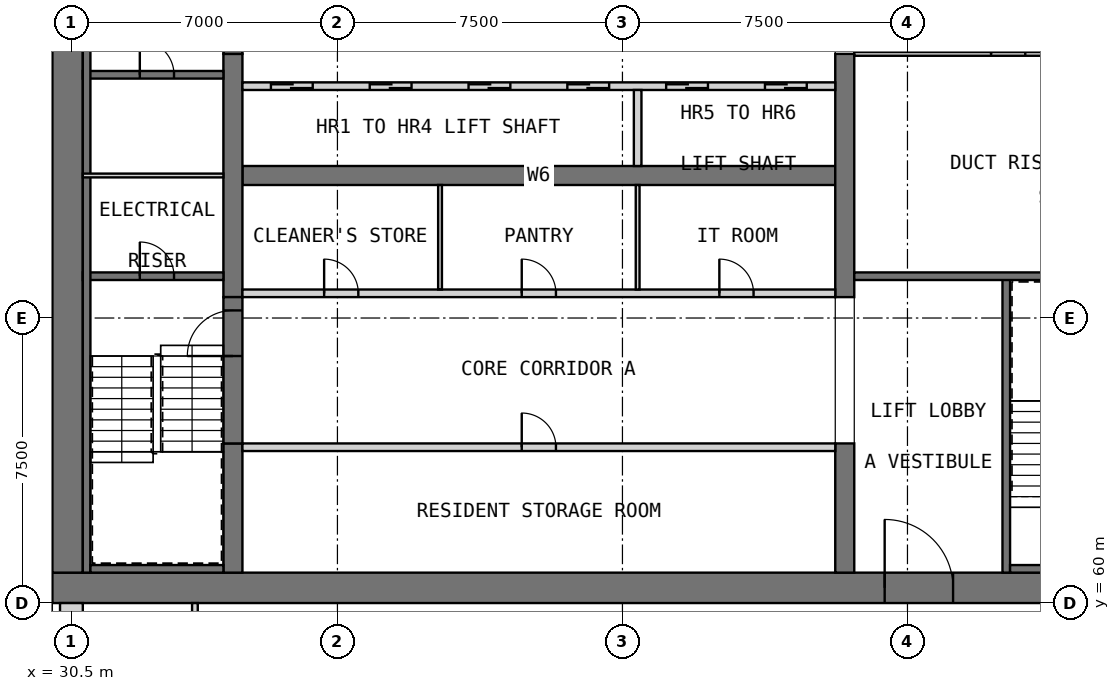
"""IFC4 building model, lengths in metres.
Left out: names, types, materials, properties, quantities, classifications, styles, units other than length and angle.
Written with IfcOpenShell. Run it as: python <this file> out.ifc"""

import sys

from ifc_helpers import new_model, si_unit, direction, frame, frame_2d, origin, place, context, subcontext, project, spatial, rectangle, extrude, element, fill, save


model = new_model("IFC4")
c1 = context("Model", 3, precision=1e-05, world=origin(), true_north=direction((0.0, 1.0)))
c2 = subcontext(c1, "Body", "Model", "MODEL_VIEW")
j1 = project(units=[si_unit("LENGTHUNIT", "METRE"), si_unit("PLANEANGLEUNIT", "RADIAN")], contexts=[c1])
p1 = place(None, origin())
s1 = spatial("IfcSite", under=j1, at=p1, CompositionType="ELEMENT")
p2 = place(p1, origin())
s2 = spatial("IfcBuilding", under=s1, at=p2, CompositionType="ELEMENT")
p3 = place(p2, frame((0.0, 0.0, 210.7)))
s3 = spatial("IfcBuildingStorey", under=s2, at=p3, CompositionType="ELEMENT", Elevation=210.7)
p4 = place(p3, frame((30.0, 60.4, 0.0), z_axis=(0.0, 0.0, 1.0), x_axis=(1.0, 0.0, 0.0)))
e1 = element("IfcWall", 1, at=p4, inside=s3, PredefinedType="SHEAR", context=c2, shape_type="SweptSolid", body=[
    extrude(rectangle(XDim=30.0, YDim=0.8, at=frame_2d((15.0, 0.0))), origin(), (0.0, 0.0, 1.0), 3.5),
])
p5 = place(p4, frame((21.9, 0.0, 0.0)))
e2 = element("IfcOpeningElement", 2, at=p5, cuts=e1, PredefinedType="OPENING", context=c2, shape_type="SweptSolid", body=[
    extrude(rectangle(XDim=1.8, YDim=2.1, at=frame_2d((0.9, 1.05))), frame((0.0, 0.41, 0.0), z_axis=(0.0, -1.0, 0.0), x_axis=(1.0, 0.0, 0.0)), (0.0, 0.0, 1.0), 0.82),
])
p6 = place(p4, frame((26.5, 0.0, 0.0)))
e3 = element("IfcOpeningElement", 3, at=p6, cuts=e1, PredefinedType="OPENING", context=c2, shape_type="SweptSolid", body=[
    extrude(rectangle(XDim=1.2, YDim=2.1, at=frame_2d((0.6, 1.05))), frame((0.0, 0.41, 0.0), z_axis=(0.0, -1.0, 0.0), x_axis=(1.0, 0.0, 0.0)), (0.0, 0.0, 1.0), 0.82),
])
p7 = place(p3, frame((30.4, 60.8, 0.0), z_axis=(0.0, 0.0, 1.0), x_axis=(0.0, 1.0, 0.0)))
e4 = element("IfcWall", 4, at=p7, inside=s3, PredefinedType="SHEAR", context=c2, shape_type="SweptSolid", body=[
    extrude(rectangle(XDim=20.9, YDim=0.8, at=frame_2d((10.45, 0.0))), origin(), (0.0, 0.0, 1.0), 3.5),
])
p8 = place(p3, frame((35.0, 71.25, 0.0), z_axis=(0.0, 0.0, 1.0), x_axis=(1.0, 0.0, 0.0)))
e5 = element("IfcWall", 5, at=p8, inside=s3, PredefinedType="SHEAR", context=c2, shape_type="SweptSolid", body=[
    extrude(rectangle(XDim=15.6, YDim=0.5, at=frame_2d((7.8, 0.0))), origin(), (0.0, 0.0, 1.0), 3.5),
])
p9 = place(p3, frame((34.75, 60.8, 0.0), z_axis=(0.0, 0.0, 1.0), x_axis=(0.0, 1.0, 0.0)))
e6 = element("IfcWall", 6, at=p9, inside=s3, PredefinedType="SHEAR", context=c2, shape_type="SweptSolid", body=[
    extrude(rectangle(XDim=3.4, YDim=0.5, at=frame_2d((1.7, 0.0))), origin(), (0.0, 0.0, 1.0), 3.5),
])
p10 = place(p3, frame((34.75, 68.05, 0.0), z_axis=(0.0, 0.0, 1.0), x_axis=(0.0, 1.0, 0.0)))
e7 = element("IfcWall", 7, at=p10, inside=s3, PredefinedType="SHEAR", context=c2, shape_type="SweptSolid", body=[
    extrude(rectangle(XDim=6.4, YDim=0.5, at=frame_2d((3.2, 0.0))), origin(), (0.0, 0.0, 1.0), 3.5),
])
p11 = place(p3, frame((50.85, 60.8, 0.0), z_axis=(0.0, 0.0, 1.0), x_axis=(0.0, 1.0, 0.0)))
e8 = element("IfcWall", 8, at=p11, inside=s3, PredefinedType="SHEAR", context=c2, shape_type="SweptSolid", body=[
    extrude(rectangle(XDim=3.4, YDim=0.5, at=frame_2d((1.7, 0.0))), origin(), (0.0, 0.0, 1.0), 3.5),
])
p12 = place(p3, frame((50.85, 68.05, 0.0), z_axis=(0.0, 0.0, 1.0), x_axis=(0.0, 1.0, 0.0)))
e9 = element("IfcWall", 9, at=p12, inside=s3, PredefinedType="SHEAR", context=c2, shape_type="SweptSolid", body=[
    extrude(rectangle(XDim=6.4, YDim=0.5, at=frame_2d((3.2, 0.0))), origin(), (0.0, 0.0, 1.0), 3.5),
])
p13 = place(p3, frame((30.5, 60.0, 0.0), z_axis=(0.0, 0.0, 1.0), x_axis=(0.0, -1.0, 0.0)))
e10 = element("IfcWall", 10, at=p13, inside=s3, PredefinedType="SOLIDWALL", context=c2, shape_type="SweptSolid", body=[
    extrude(rectangle(XDim=7.0, YDim=0.6, at=frame_2d((3.5, 0.0))), origin(), (0.0, 0.0, 1.0), 3.1),
])
p14 = place(p13, frame((4.175, 0.0, 0.8)))
e11 = element("IfcOpeningElement", 11, at=p14, cuts=e10, PredefinedType="OPENING", context=c2, shape_type="SweptSolid", body=[
    extrude(rectangle(XDim=2.4, YDim=1.8, at=frame_2d((1.2, 0.9))), frame((0.0, 0.31, 0.0), z_axis=(0.0, -1.0, 0.0), x_axis=(1.0, 0.0, 0.0)), (0.0, 0.0, 1.0), 0.62),
])
p15 = place(p13, frame((0.675, 0.0, 0.8)))
e12 = element("IfcOpeningElement", 12, at=p15, cuts=e10, PredefinedType="OPENING", context=c2, shape_type="SweptSolid", body=[
    extrude(rectangle(XDim=2.4, YDim=1.8, at=frame_2d((1.2, 0.9))), frame((0.0, 0.31, 0.0), z_axis=(0.0, -1.0, 0.0), x_axis=(1.0, 0.0, 0.0)), (0.0, 0.0, 1.0), 0.62),
])
p16 = place(p3, frame((35.0, 64.1, 0.0), z_axis=(0.0, 0.0, 1.0), x_axis=(1.0, 0.0, 0.0)))
e13 = element("IfcWall", 13, at=p16, inside=s3, PredefinedType="PARTITIONING", context=c2, shape_type="SweptSolid", body=[
    extrude(rectangle(XDim=15.6, YDim=0.2, at=frame_2d((7.8, 0.0))), origin(), (0.0, 0.0, 1.0), 3.09),
])
p17 = place(p16, frame((7.35, 0.0, 0.0)))
e14 = element("IfcOpeningElement", 14, at=p17, cuts=e13, PredefinedType="OPENING", context=c2, shape_type="SweptSolid", body=[
    extrude(rectangle(XDim=0.9, YDim=2.1, at=frame_2d((0.45, 1.05))), frame((0.0, 0.11, 0.0), z_axis=(0.0, -1.0, 0.0), x_axis=(1.0, 0.0, 0.0)), (0.0, 0.0, 1.0), 0.22),
])
p18 = place(p3, frame((35.0, 68.15, 0.0), z_axis=(0.0, 0.0, 1.0), x_axis=(1.0, 0.0, 0.0)))
e15 = element("IfcWall", 15, at=p18, inside=s3, PredefinedType="PARTITIONING", context=c2, shape_type="SweptSolid", body=[
    extrude(rectangle(XDim=15.6, YDim=0.2, at=frame_2d((7.8, 0.0))), origin(), (0.0, 0.0, 1.0), 3.09),
])
p19 = place(p18, frame((2.15, 0.0, 0.0)))
e16 = element("IfcOpeningElement", 16, at=p19, cuts=e15, PredefinedType="OPENING", context=c2, shape_type="SweptSolid", body=[
    extrude(rectangle(XDim=0.9, YDim=2.1, at=frame_2d((0.45, 1.05))), frame((0.0, 0.11, 0.0), z_axis=(0.0, -1.0, 0.0), x_axis=(1.0, 0.0, 0.0)), (0.0, 0.0, 1.0), 0.22),
])
p20 = place(p18, frame((7.35, 0.0, 0.0)))
e17 = element("IfcOpeningElement", 17, at=p20, cuts=e15, PredefinedType="OPENING", context=c2, shape_type="SweptSolid", body=[
    extrude(rectangle(XDim=0.9, YDim=2.1, at=frame_2d((0.45, 1.05))), frame((0.0, 0.11, 0.0), z_axis=(0.0, -1.0, 0.0), x_axis=(1.0, 0.0, 0.0)), (0.0, 0.0, 1.0), 0.22),
])
p21 = place(p18, frame((12.55, 0.0, 0.0)))
e18 = element("IfcOpeningElement", 18, at=p21, cuts=e15, PredefinedType="OPENING", context=c2, shape_type="SweptSolid", body=[
    extrude(rectangle(XDim=0.9, YDim=2.1, at=frame_2d((0.45, 1.05))), frame((0.0, 0.11, 0.0), z_axis=(0.0, -1.0, 0.0), x_axis=(1.0, 0.0, 0.0)), (0.0, 0.0, 1.0), 0.22),
])
for number, where, z_axis, x_axis in (
    (19, (40.2, 68.25, 0.0), (0.0, 0.0, 1.0), (0.0, 1.0, 0.0)),
    (20, (45.4, 68.25, 0.0), (0.0, 0.0, 1.0), (0.0, 1.0, 0.0)),
):
    element("IfcWall", number, at=place(p3, frame(where, z_axis=z_axis, x_axis=x_axis)), inside=s3, PredefinedType="PARTITIONING", context=c2, shape_type="SweptSolid", body=[
        extrude(rectangle(XDim=2.75, YDim=0.1, at=frame_2d((1.375, 0.0))), origin(), (0.0, 0.0, 1.0), 3.09),
    ])
p22 = place(p3, frame((35.0, 73.6, 0.0), z_axis=(0.0, 0.0, 1.0), x_axis=(1.0, 0.0, 0.0)))
e21 = element("IfcWall", 21, at=p22, inside=s3, PredefinedType="SOLIDWALL", context=c2, shape_type="SweptSolid", body=[
    extrude(rectangle(XDim=15.6, YDim=0.2, at=frame_2d((7.8, 0.0))), origin(), (0.0, 0.0, 1.0), 3.5),
])
p23 = place(p22, frame((0.75, 0.0, 0.0)))
e22 = element("IfcOpeningElement", 22, at=p23, cuts=e21, PredefinedType="OPENING", context=c2, shape_type="SweptSolid", body=[
    extrude(rectangle(XDim=1.1, YDim=2.1, at=frame_2d((0.55, 1.05))), frame((0.0, 0.11, 0.0), z_axis=(0.0, -1.0, 0.0), x_axis=(1.0, 0.0, 0.0)), (0.0, 0.0, 1.0), 0.22),
])
p24 = place(p22, frame((3.35, 0.0, 0.0)))
e23 = element("IfcOpeningElement", 23, at=p24, cuts=e21, PredefinedType="OPENING", context=c2, shape_type="SweptSolid", body=[
    extrude(rectangle(XDim=1.1, YDim=2.1, at=frame_2d((0.55, 1.05))), frame((0.0, 0.11, 0.0), z_axis=(0.0, -1.0, 0.0), x_axis=(1.0, 0.0, 0.0)), (0.0, 0.0, 1.0), 0.22),
])
p25 = place(p22, frame((5.95, 0.0, 0.0)))
e24 = element("IfcOpeningElement", 24, at=p25, cuts=e21, PredefinedType="OPENING", context=c2, shape_type="SweptSolid", body=[
    extrude(rectangle(XDim=1.1, YDim=2.1, at=frame_2d((0.55, 1.05))), frame((0.0, 0.11, 0.0), z_axis=(0.0, -1.0, 0.0), x_axis=(1.0, 0.0, 0.0)), (0.0, 0.0, 1.0), 0.22),
])
p26 = place(p22, frame((8.55, 0.0, 0.0)))
e25 = element("IfcOpeningElement", 25, at=p26, cuts=e21, PredefinedType="OPENING", context=c2, shape_type="SweptSolid", body=[
    extrude(rectangle(XDim=1.1, YDim=2.1, at=frame_2d((0.55, 1.05))), frame((0.0, 0.11, 0.0), z_axis=(0.0, -1.0, 0.0), x_axis=(1.0, 0.0, 0.0)), (0.0, 0.0, 1.0), 0.22),
])
p27 = place(p22, frame((11.15, 0.0, 0.0)))
e26 = element("IfcOpeningElement", 26, at=p27, cuts=e21, PredefinedType="OPENING", context=c2, shape_type="SweptSolid", body=[
    extrude(rectangle(XDim=1.1, YDim=2.1, at=frame_2d((0.55, 1.05))), frame((0.0, 0.11, 0.0), z_axis=(0.0, -1.0, 0.0), x_axis=(1.0, 0.0, 0.0)), (0.0, 0.0, 1.0), 0.22),
])
p28 = place(p22, frame((13.75, 0.0, 0.0)))
e27 = element("IfcOpeningElement", 27, at=p28, cuts=e21, PredefinedType="OPENING", context=c2, shape_type="SweptSolid", body=[
    extrude(rectangle(XDim=1.1, YDim=2.1, at=frame_2d((0.55, 1.05))), frame((0.0, 0.11, 0.0), z_axis=(0.0, -1.0, 0.0), x_axis=(1.0, 0.0, 0.0)), (0.0, 0.0, 1.0), 0.22),
])
p29 = place(p3, frame((45.4, 71.5, 0.0), z_axis=(0.0, 0.0, 1.0), x_axis=(0.0, 1.0, 0.0)))
e28 = element("IfcWall", 28, at=p29, inside=s3, PredefinedType="SOLIDWALL", context=c2, shape_type="SweptSolid", body=[
    extrude(rectangle(XDim=2.0, YDim=0.2, at=frame_2d((1.0, 0.0))), origin(), (0.0, 0.0, 1.0), 3.5),
])
p30 = place(p3, frame((34.75, 64.2, 0.0), z_axis=(0.0, 0.0, 1.0), x_axis=(0.0, 1.0, 0.0)))
e29 = element("IfcWall", 29, at=p30, inside=s3, PredefinedType="SOLIDWALL", context=c2, shape_type="SweptSolid", body=[
    extrude(rectangle(XDim=3.85, YDim=0.5, at=frame_2d((1.925, 0.0))), origin(), (0.0, 0.0, 1.0), 2.3),
])
p31 = place(p30, frame((2.3, 0.0, 0.0)))
e30 = element("IfcOpeningElement", 30, at=p31, cuts=e29, PredefinedType="OPENING", context=c2, shape_type="SweptSolid", body=[
    extrude(rectangle(XDim=1.2, YDim=2.1, at=frame_2d((0.6, 1.05))), frame((0.0, 0.26, 0.0), z_axis=(0.0, -1.0, 0.0), x_axis=(1.0, 0.0, 0.0)), (0.0, 0.0, 1.0), 0.52),
])
p32 = place(p3, frame((34.75, 74.45, 0.0), z_axis=(0.0, 0.0, 1.0), x_axis=(0.0, 1.0, 0.0)))
e31 = element("IfcWall", 31, at=p32, inside=s3, PredefinedType="SOLIDWALL", context=c2, shape_type="SweptSolid", body=[
    extrude(rectangle(XDim=3.85, YDim=0.5, at=frame_2d((1.925, 0.0))), origin(), (0.0, 0.0, 1.0), 2.3),
])
p33 = place(p32, frame((1.0, 0.0, 0.0)))
e32 = element("IfcOpeningElement", 32, at=p33, cuts=e31, PredefinedType="OPENING", context=c2, shape_type="SweptSolid", body=[
    extrude(rectangle(XDim=1.2, YDim=2.1, at=frame_2d((0.6, 1.05))), frame((0.0, 0.26, 0.0), z_axis=(0.0, -1.0, 0.0), x_axis=(1.0, 0.0, 0.0)), (0.0, 0.0, 1.0), 0.52),
])
p34 = place(p3, frame((30.8, 68.6, 0.0), z_axis=(0.0, 0.0, 1.0), x_axis=(1.0, 0.0, 0.0)))
e33 = element("IfcWall", 33, at=p34, inside=s3, PredefinedType="SOLIDWALL", context=c2, shape_type="SweptSolid", body=[
    extrude(rectangle(XDim=3.7, YDim=0.2, at=frame_2d((1.85, 0.0))), origin(), (0.0, 0.0, 1.0), 3.09),
])
p35 = place(p34, frame((1.5, 0.0, 0.0)))
e34 = element("IfcOpeningElement", 34, at=p35, cuts=e33, PredefinedType="OPENING", context=c2, shape_type="SweptSolid", body=[
    extrude(rectangle(XDim=0.9, YDim=2.1, at=frame_2d((0.45, 1.05))), frame((0.0, 0.11, 0.0), z_axis=(0.0, -1.0, 0.0), x_axis=(1.0, 0.0, 0.0)), (0.0, 0.0, 1.0), 0.22),
])
p36 = place(p3, frame((30.8, 73.9, 0.0), z_axis=(0.0, 0.0, 1.0), x_axis=(1.0, 0.0, 0.0)))
e35 = element("IfcWall", 35, at=p36, inside=s3, PredefinedType="SOLIDWALL", context=c2, shape_type="SweptSolid", body=[
    extrude(rectangle(XDim=3.7, YDim=0.2, at=frame_2d((1.85, 0.0))), origin(), (0.0, 0.0, 1.0), 3.09),
])
p37 = place(p36, frame((1.5, 0.0, 0.0)))
e36 = element("IfcOpeningElement", 36, at=p37, cuts=e35, PredefinedType="OPENING", context=c2, shape_type="SweptSolid", body=[
    extrude(rectangle(XDim=0.9, YDim=2.1, at=frame_2d((0.45, 1.05))), frame((0.0, 0.11, 0.0), z_axis=(0.0, -1.0, 0.0), x_axis=(1.0, 0.0, 0.0)), (0.0, 0.0, 1.0), 0.22),
])
p38 = place(p3, frame((55.1, 60.8, 0.0), z_axis=(0.0, 0.0, 1.0), x_axis=(0.0, 1.0, 0.0)))
e37 = element("IfcWall", 37, at=p38, inside=s3, PredefinedType="SOLIDWALL", context=c2, shape_type="SweptSolid", body=[
    extrude(rectangle(XDim=7.8, YDim=0.2, at=frame_2d((3.9, 0.0))), origin(), (0.0, 0.0, 1.0), 3.09),
])
p39 = place(p3, frame((51.1, 68.6, 0.0), z_axis=(0.0, 0.0, 1.0), x_axis=(1.0, 0.0, 0.0)))
e38 = element("IfcWall", 38, at=p39, inside=s3, PredefinedType="SOLIDWALL", context=c2, shape_type="SweptSolid", body=[
    extrude(rectangle(XDim=8.1, YDim=0.2, at=frame_2d((4.05, 0.0))), origin(), (0.0, 0.0, 1.0), 3.09),
])
p40 = place(p3, frame((30.9, 60.8, 0.0), z_axis=(0.0, 0.0, 1.0), x_axis=(0.0, 1.0, 0.0)))
e39 = element("IfcWall", 39, at=p40, inside=s3, PredefinedType="SOLIDWALL", context=c2, shape_type="SweptSolid", body=[
    extrude(rectangle(XDim=20.9, YDim=0.2, at=frame_2d((10.45, 0.0))), origin(), (0.0, 0.0, 1.0), 3.09),
])
p41 = place(p3, frame((31.0, 60.9, 0.0), z_axis=(0.0, 0.0, 1.0), x_axis=(1.0, 0.0, 0.0)))
e40 = element("IfcWall", 40, at=p41, inside=s3, PredefinedType="SOLIDWALL", context=c2, shape_type="SweptSolid", body=[
    extrude(rectangle(XDim=3.5, YDim=0.2, at=frame_2d((1.75, 0.0))), origin(), (0.0, 0.0, 1.0), 3.09),
])
p42 = place(p3, frame((55.2, 60.9, 0.0), z_axis=(0.0, 0.0, 1.0), x_axis=(1.0, 0.0, 0.0)))
e41 = element("IfcWall", 41, at=p42, inside=s3, PredefinedType="SOLIDWALL", context=c2, shape_type="SweptSolid", body=[
    extrude(rectangle(XDim=1.3, YDim=0.2, at=frame_2d((0.65, 0.0))), origin(), (0.0, 0.0, 1.0), 3.09),
])
p43 = place(p3, frame((30.8, 71.25, 0.0), z_axis=(0.0, 0.0, 1.0), x_axis=(1.0, 0.0, 0.0)))
e42 = element("IfcWall", 42, at=p43, inside=s3, PredefinedType="PARTITIONING", context=c2, shape_type="SweptSolid", body=[
    extrude(rectangle(XDim=3.7, YDim=0.1, at=frame_2d((1.85, 0.0))), origin(), (0.0, 0.0, 1.0), 3.09),
])
p44 = place(p3, frame((51.1, 74.45, 0.0), z_axis=(0.0, 0.0, 1.0), x_axis=(1.0, 0.0, 0.0)))
e43 = element("IfcWall", 43, at=p44, inside=s3, PredefinedType="PARTITIONING", context=c2, shape_type="SweptSolid", body=[
    extrude(rectangle(XDim=8.1, YDim=0.1, at=frame_2d((4.05, 0.0))), origin(), (0.0, 0.0, 1.0), 3.09),
])
p45 = place(p44, frame((3.6, 0.0, 0.0)))
e44 = element("IfcOpeningElement", 44, at=p45, cuts=e43, PredefinedType="OPENING", context=c2, shape_type="SweptSolid", body=[
    extrude(rectangle(XDim=0.9, YDim=2.1, at=frame_2d((0.45, 1.05))), frame((0.0, 0.06, 0.0), z_axis=(0.0, -1.0, 0.0), x_axis=(1.0, 0.0, 0.0)), (0.0, 0.0, 1.0), 0.12),
])
p46 = place(p3, frame((33.75, 57.975, 0.0), z_axis=(0.0, 0.0, 1.0), x_axis=(0.0, 1.0, 0.0)))
e45 = element("IfcWall", 45, at=p46, inside=s3, PredefinedType="PARTITIONING", context=c2, shape_type="SweptSolid", body=[
    extrude(rectangle(XDim=2.025, YDim=0.15, at=frame_2d((1.012, 0.0))), origin(), (0.0, 0.0, 1.0), 3.1),
])
p47 = place(p17, origin())
e46 = element("IfcDoor", 46, at=p47, inside=s3, OperationType="SINGLE_SWING_RIGHT", PredefinedType="DOOR", context=c2, shape_type="SweptSolid", body=[
    extrude(rectangle(XDim=0.9, YDim=2.1, at=frame_2d((0.45, 1.05))), frame((0.0, 0.025, 0.0), z_axis=(0.0, -1.0, 0.0), x_axis=(1.0, 0.0, 0.0)), (0.0, 0.0, 1.0), 0.05),
])
fill(e14, e46)
p48 = place(p19, origin())
e47 = element("IfcDoor", 47, at=p48, inside=s3, OperationType="SINGLE_SWING_RIGHT", PredefinedType="DOOR", context=c2, shape_type="SweptSolid", body=[
    extrude(rectangle(XDim=0.9, YDim=2.1, at=frame_2d((0.45, 1.05))), frame((0.0, 0.025, 0.0), z_axis=(0.0, -1.0, 0.0), x_axis=(1.0, 0.0, 0.0)), (0.0, 0.0, 1.0), 0.05),
])
fill(e16, e47)
p49 = place(p20, origin())
e48 = element("IfcDoor", 48, at=p49, inside=s3, OperationType="SINGLE_SWING_LEFT", PredefinedType="DOOR", context=c2, shape_type="SweptSolid", body=[
    extrude(rectangle(XDim=0.9, YDim=2.1, at=frame_2d((0.45, 1.05))), frame((0.0, 0.025, 0.0), z_axis=(0.0, -1.0, 0.0), x_axis=(1.0, 0.0, 0.0)), (0.0, 0.0, 1.0), 0.05),
])
fill(e17, e48)
p50 = place(p21, origin())
e49 = element("IfcDoor", 49, at=p50, inside=s3, OperationType="SINGLE_SWING_RIGHT", PredefinedType="DOOR", context=c2, shape_type="SweptSolid", body=[
    extrude(rectangle(XDim=0.9, YDim=2.1, at=frame_2d((0.45, 1.05))), frame((0.0, 0.025, 0.0), z_axis=(0.0, -1.0, 0.0), x_axis=(1.0, 0.0, 0.0)), (0.0, 0.0, 1.0), 0.05),
])
fill(e18, e49)
p51 = place(p23, origin())
e50 = element("IfcDoor", 50, at=p51, inside=s3, OperationType="DOUBLE_DOOR_SLIDING", PredefinedType="DOOR", context=c2, shape_type="SweptSolid", body=[
    extrude(rectangle(XDim=1.1, YDim=2.1, at=frame_2d((0.55, 1.05))), frame((0.0, 0.025, 0.0), z_axis=(0.0, -1.0, 0.0), x_axis=(1.0, 0.0, 0.0)), (0.0, 0.0, 1.0), 0.05),
])
fill(e22, e50)
p52 = place(p24, origin())
e51 = element("IfcDoor", 51, at=p52, inside=s3, OperationType="DOUBLE_DOOR_SLIDING", PredefinedType="DOOR", context=c2, shape_type="SweptSolid", body=[
    extrude(rectangle(XDim=1.1, YDim=2.1, at=frame_2d((0.55, 1.05))), frame((0.0, 0.025, 0.0), z_axis=(0.0, -1.0, 0.0), x_axis=(1.0, 0.0, 0.0)), (0.0, 0.0, 1.0), 0.05),
])
fill(e23, e51)
p53 = place(p25, origin())
e52 = element("IfcDoor", 52, at=p53, inside=s3, OperationType="DOUBLE_DOOR_SLIDING", PredefinedType="DOOR", context=c2, shape_type="SweptSolid", body=[
    extrude(rectangle(XDim=1.1, YDim=2.1, at=frame_2d((0.55, 1.05))), frame((0.0, 0.025, 0.0), z_axis=(0.0, -1.0, 0.0), x_axis=(1.0, 0.0, 0.0)), (0.0, 0.0, 1.0), 0.05),
])
fill(e24, e52)
p54 = place(p26, origin())
e53 = element("IfcDoor", 53, at=p54, inside=s3, OperationType="DOUBLE_DOOR_SLIDING", PredefinedType="DOOR", context=c2, shape_type="SweptSolid", body=[
    extrude(rectangle(XDim=1.1, YDim=2.1, at=frame_2d((0.55, 1.05))), frame((0.0, 0.025, 0.0), z_axis=(0.0, -1.0, 0.0), x_axis=(1.0, 0.0, 0.0)), (0.0, 0.0, 1.0), 0.05),
])
fill(e25, e53)
p55 = place(p27, origin())
e54 = element("IfcDoor", 54, at=p55, inside=s3, OperationType="DOUBLE_DOOR_SLIDING", PredefinedType="DOOR", context=c2, shape_type="SweptSolid", body=[
    extrude(rectangle(XDim=1.1, YDim=2.1, at=frame_2d((0.55, 1.05))), frame((0.0, 0.025, 0.0), z_axis=(0.0, -1.0, 0.0), x_axis=(1.0, 0.0, 0.0)), (0.0, 0.0, 1.0), 0.05),
])
fill(e26, e54)
p56 = place(p28, origin())
e55 = element("IfcDoor", 55, at=p56, inside=s3, OperationType="DOUBLE_DOOR_SLIDING", PredefinedType="DOOR", context=c2, shape_type="SweptSolid", body=[
    extrude(rectangle(XDim=1.1, YDim=2.1, at=frame_2d((0.55, 1.05))), frame((0.0, 0.025, 0.0), z_axis=(0.0, -1.0, 0.0), x_axis=(1.0, 0.0, 0.0)), (0.0, 0.0, 1.0), 0.05),
])
fill(e27, e55)
p57 = place(p5, origin())
e56 = element("IfcDoor", 56, at=p57, inside=s3, OperationType="DOUBLE_DOOR_SINGLE_SWING", PredefinedType="DOOR", context=c2, shape_type="SweptSolid", body=[
    extrude(rectangle(XDim=1.8, YDim=2.1, at=frame_2d((0.9, 1.05))), frame((0.0, 0.025, 0.0), z_axis=(0.0, -1.0, 0.0), x_axis=(1.0, 0.0, 0.0)), (0.0, 0.0, 1.0), 0.05),
])
fill(e2, e56)
p58 = place(p31, origin())
e57 = element("IfcDoor", 57, at=p58, inside=s3, OperationType="SINGLE_SWING_LEFT", PredefinedType="DOOR", context=c2, shape_type="SweptSolid", body=[
    extrude(rectangle(XDim=1.2, YDim=2.1, at=frame_2d((0.6, 1.05))), frame((0.0, 0.025, 0.0), z_axis=(0.0, -1.0, 0.0), x_axis=(1.0, 0.0, 0.0)), (0.0, 0.0, 1.0), 0.05),
])
fill(e30, e57)
p59 = place(p35, origin())
e58 = element("IfcDoor", 58, at=p59, inside=s3, OperationType="SINGLE_SWING_LEFT", PredefinedType="DOOR", context=c2, shape_type="SweptSolid", body=[
    extrude(rectangle(XDim=0.9, YDim=2.1, at=frame_2d((0.45, 1.05))), frame((0.0, 0.025, 0.0), z_axis=(0.0, -1.0, 0.0), x_axis=(1.0, 0.0, 0.0)), (0.0, 0.0, 1.0), 0.05),
])
fill(e34, e58)
p60 = place(p37, origin())
e59 = element("IfcDoor", 59, at=p60, inside=s3, OperationType="SINGLE_SWING_RIGHT", PredefinedType="DOOR", context=c2, shape_type="SweptSolid", body=[
    extrude(rectangle(XDim=0.9, YDim=2.1, at=frame_2d((0.45, 1.05))), frame((0.0, 0.025, 0.0), z_axis=(0.0, -1.0, 0.0), x_axis=(1.0, 0.0, 0.0)), (0.0, 0.0, 1.0), 0.05),
])
fill(e36, e59)
p61 = place(p45, origin())
e60 = element("IfcDoor", 60, at=p61, inside=s3, OperationType="SINGLE_SWING_RIGHT", PredefinedType="DOOR", context=c2, shape_type="SweptSolid", body=[
    extrude(rectangle(XDim=0.9, YDim=2.1, at=frame_2d((0.45, 1.05))), frame((0.0, 0.025, 0.0), z_axis=(0.0, -1.0, 0.0), x_axis=(1.0, 0.0, 0.0)), (0.0, 0.0, 1.0), 0.05),
])
fill(e44, e60)
save(model, sys.argv[1])
